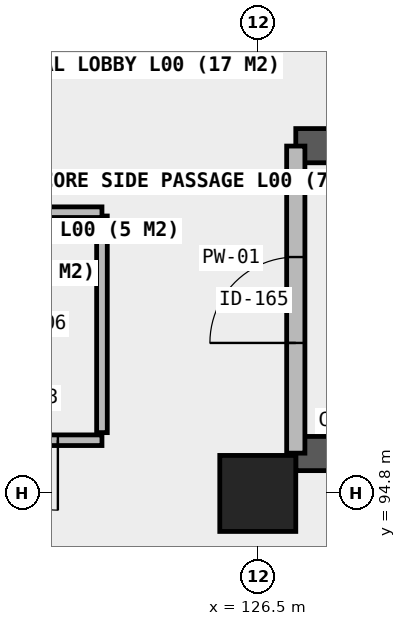
"""IFC4 building model, lengths in metres.
Left out: names, types, materials, properties, quantities, classifications, styles, units other than length and angle.
Written with IfcOpenShell. Run it as: python <this file> out.ifc"""

import sys

from ifc_helpers import new_model, si_unit, direction, frame, frame_2d, origin, origin_2d, place, context, subcontext, project, spatial, rectangle, extrude, element, fill, save


model = new_model("IFC4")
c1 = context("Model", 3, precision=1e-05, world=origin(), true_north=direction((0.0, 1.0)))
c2 = subcontext(c1, "Body", "Model", "MODEL_VIEW")
j1 = project(units=[si_unit("LENGTHUNIT", "METRE"), si_unit("PLANEANGLEUNIT", "RADIAN")], contexts=[c1])
p1 = place(None, origin())
s1 = spatial("IfcSite", under=j1, at=p1, CompositionType="ELEMENT")
p2 = place(p1, origin())
s2 = spatial("IfcBuilding", under=s1, at=p2, CompositionType="ELEMENT")
p3 = place(p2, origin())
s3 = spatial("IfcBuildingStorey", under=s2, at=p3, CompositionType="ELEMENT", Elevation=0.0)
p4 = place(p3, frame((126.5, 94.8, 0.0), z_axis=(0.0, 0.0, 1.0), x_axis=(1.0, 0.0, 0.0)))
e1 = element("IfcColumn", 1, at=p4, inside=s3, PredefinedType="COLUMN", context=c2, shape_type="SweptSolid", body=[
    extrude(rectangle(XDim=1.0, YDim=1.0, at=origin_2d()), origin(), (0.0, 0.0, 1.0), 4.2),
])
p5 = place(p3, frame((127.0, 95.325, 0.0), z_axis=(0.0, 0.0, 1.0), x_axis=(1.0, 0.0, 0.0)))
e2 = element("IfcWall", 2, at=p5, inside=s3, PredefinedType="SHEAR", context=c2, shape_type="SweptSolid", body=[
    extrude(rectangle(XDim=9.15, YDim=0.45, at=frame_2d((4.575, 0.0))), origin(), (0.0, 0.0, 1.0), 4.2),
])
p6 = place(p3, frame((127.0, 99.375, 0.0), z_axis=(0.0, 0.0, 1.0), x_axis=(1.0, 0.0, 0.0)))
e3 = element("IfcWall", 3, at=p6, inside=s3, PredefinedType="SHEAR", context=c2, shape_type="SweptSolid", body=[
    extrude(rectangle(XDim=9.15, YDim=0.45, at=frame_2d((4.575, 0.0))), origin(), (0.0, 0.0, 1.0), 4.2),
])
p7 = place(p6, frame((0.55, 0.0, 0.0)))
e4 = element("IfcOpeningElement", 4, at=p7, cuts=e3, PredefinedType="OPENING", context=c2, shape_type="SweptSolid", body=[
    extrude(rectangle(XDim=1.13, YDim=2.15, at=frame_2d((0.565, 1.075))), frame((0.0, 0.235, 0.0), z_axis=(0.0, -1.0, 0.0), x_axis=(1.0, 0.0, 0.0)), (0.0, 0.0, 1.0), 0.47),
])
p8 = place(p3, frame((127.0, 95.33, 0.0), z_axis=(0.0, 0.0, 1.0), x_axis=(0.0, 1.0, 0.0)))
e5 = element("IfcWall", 5, at=p8, inside=s3, PredefinedType="SOLIDWALL", context=c2, shape_type="SweptSolid", body=[
    extrude(rectangle(XDim=4.04, YDim=0.24, at=frame_2d((2.02, 0.0))), origin(), (0.0, 0.0, 1.0), 3.88),
])
p9 = place(p8, frame((1.45, 0.0, 0.0)))
e6 = element("IfcOpeningElement", 6, at=p9, cuts=e5, PredefinedType="OPENING", context=c2, shape_type="SweptSolid", body=[
    extrude(rectangle(XDim=1.13, YDim=2.15, at=frame_2d((0.565, 1.075))), frame((0.0, 0.13, 0.0), z_axis=(0.0, -1.0, 0.0), x_axis=(1.0, 0.0, 0.0)), (0.0, 0.0, 1.0), 0.26),
])
p10 = place(p3, frame((118.15, 95.5, 0.0), z_axis=(0.0, 0.0, 1.0), x_axis=(1.0, 0.0, 0.0)))
e7 = element("IfcWall", 7, at=p10, inside=s3, PredefinedType="PLUMBINGWALL", context=c2, shape_type="SweptSolid", body=[
    extrude(rectangle(XDim=6.3, YDim=0.14, at=frame_2d((3.15, 0.0))), origin(), (0.0, 0.0, 1.0), 3.88),
])
p11 = place(p10, frame((0.72, 0.0, 0.0)))
e8 = element("IfcOpeningElement", 8, at=p11, cuts=e7, PredefinedType="OPENING", context=c2, shape_type="SweptSolid", body=[
    extrude(rectangle(XDim=0.95, YDim=2.1, at=frame_2d((0.475, 1.05))), frame((0.0, 0.08, 0.0), z_axis=(0.0, -1.0, 0.0), x_axis=(1.0, 0.0, 0.0)), (0.0, 0.0, 1.0), 0.16),
])
p12 = place(p10, frame((2.8, 0.0, 0.0)))
e9 = element("IfcOpeningElement", 9, at=p12, cuts=e7, PredefinedType="OPENING", context=c2, shape_type="SweptSolid", body=[
    extrude(rectangle(XDim=0.92, YDim=2.1, at=frame_2d((0.46, 1.05))), frame((0.0, 0.08, 0.0), z_axis=(0.0, -1.0, 0.0), x_axis=(1.0, 0.0, 0.0)), (0.0, 0.0, 1.0), 0.16),
])
p13 = place(p10, frame((4.8, 0.0, 0.0)))
e10 = element("IfcOpeningElement", 10, at=p13, cuts=e7, PredefinedType="OPENING", context=c2, shape_type="SweptSolid", body=[
    extrude(rectangle(XDim=0.92, YDim=2.1, at=frame_2d((0.46, 1.05))), frame((0.0, 0.08, 0.0), z_axis=(0.0, -1.0, 0.0), x_axis=(1.0, 0.0, 0.0)), (0.0, 0.0, 1.0), 0.16),
])
p14 = place(p3, frame((124.45, 95.6, 0.0), z_axis=(0.0, 0.0, 1.0), x_axis=(0.0, 1.0, 0.0)))
e11 = element("IfcWall", 11, at=p14, inside=s3, PredefinedType="PLUMBINGWALL", context=c2, shape_type="SweptSolid", body=[
    extrude(rectangle(XDim=2.85, YDim=0.14, at=frame_2d((1.425, 0.0))), origin(), (0.0, 0.0, 1.0), 3.88),
])
p15 = place(p3, frame((118.15, 98.5, 0.0), z_axis=(0.0, 0.0, 1.0), x_axis=(1.0, 0.0, 0.0)))
e12 = element("IfcWall", 12, at=p15, inside=s3, PredefinedType="PLUMBINGWALL", context=c2, shape_type="SweptSolid", body=[
    extrude(rectangle(XDim=6.3, YDim=0.14, at=frame_2d((3.15, 0.0))), origin(), (0.0, 0.0, 1.0), 3.88),
])
p16 = place(p9, origin())
e13 = element("IfcDoor", 13, at=p16, inside=s3, OperationType="SINGLE_SWING_LEFT", PredefinedType="DOOR", context=c2, shape_type="SweptSolid", body=[
    extrude(rectangle(XDim=1.13, YDim=2.15, at=frame_2d((0.565, 1.075))), frame((0.0, 0.025, 0.0), z_axis=(0.0, -1.0, 0.0), x_axis=(1.0, 0.0, 0.0)), (0.0, 0.0, 1.0), 0.05),
])
fill(e6, e13)
p17 = place(p13, origin())
e14 = element("IfcDoor", 14, at=p17, inside=s3, OperationType="SINGLE_SWING_RIGHT", PredefinedType="DOOR", context=c2, shape_type="SweptSolid", body=[
    extrude(rectangle(XDim=0.92, YDim=2.1, at=frame_2d((0.46, 1.05))), frame((0.0, 0.025, 0.0), z_axis=(0.0, -1.0, 0.0), x_axis=(1.0, 0.0, 0.0)), (0.0, 0.0, 1.0), 0.05),
])
fill(e10, e14)
save(model, sys.argv[1])
